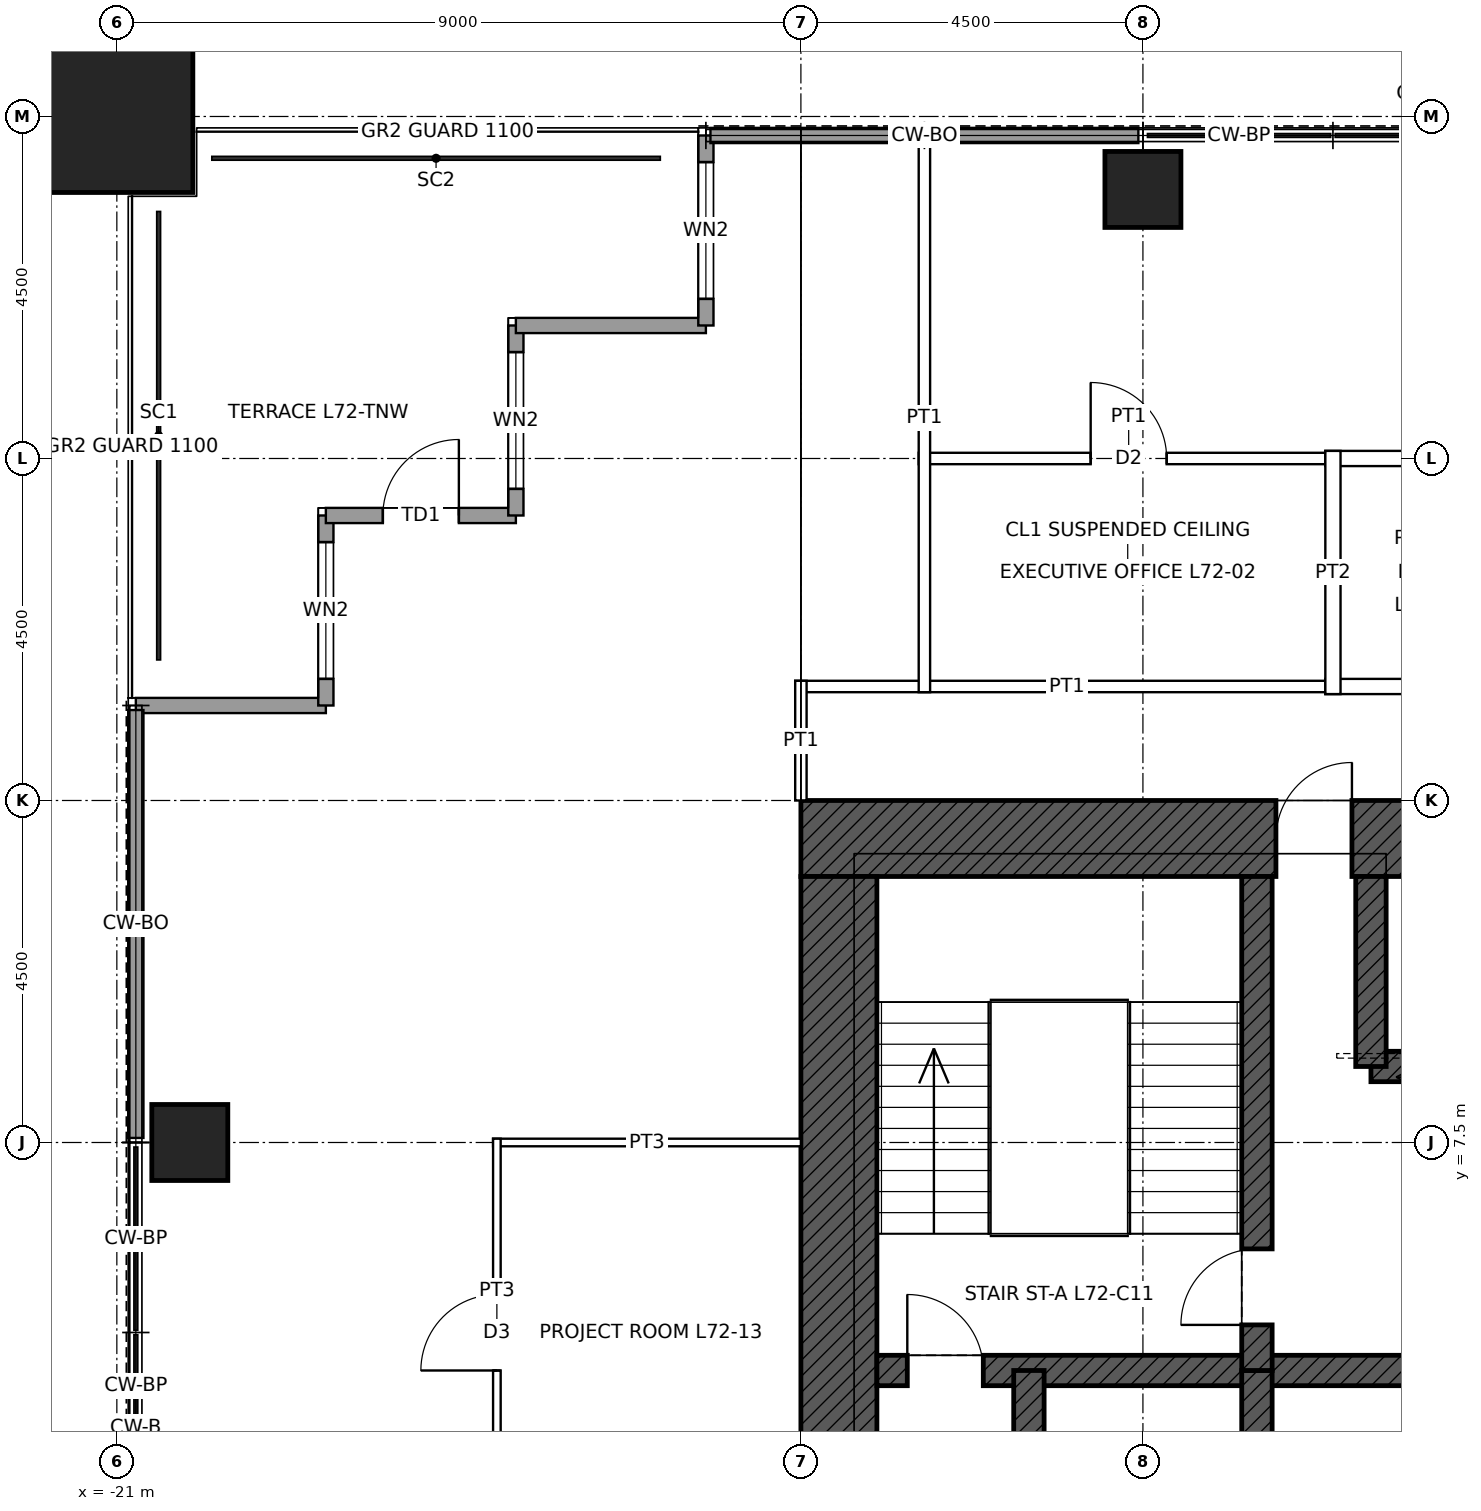
"""IFC4 building model, lengths in metres.
Left out: names, types, materials, properties, quantities, classifications, styles, units other than length and angle.
Written with IfcOpenShell. Run it as: python <this file> out.ifc"""

import sys

from ifc_helpers import new_model, si_unit, direction, frame, frame_2d, origin, origin_2d, place, context, subcontext, project, spatial, rectangle, hollow_rectangle, extrude, element, fill, save


model = new_model("IFC4")
c1 = context("Model", 3, precision=1e-05, world=origin(), true_north=direction((0.0, 1.0)))
c2 = subcontext(c1, "Body", "Model", "MODEL_VIEW")
j1 = project(units=[si_unit("LENGTHUNIT", "METRE"), si_unit("PLANEANGLEUNIT", "RADIAN")], contexts=[c1])
p1 = place(None, origin())
s1 = spatial("IfcSite", under=j1, at=p1, CompositionType="ELEMENT")
p2 = place(p1, origin())
s2 = spatial("IfcBuilding", under=s1, at=p2, CompositionType="ELEMENT")
p3 = place(p2, frame((0.0, 0.0, 323.9)))
s3 = spatial("IfcBuildingStorey", under=s2, at=p3, CompositionType="ELEMENT", Elevation=323.9)
p4 = place(p3, frame((-21.0, 21.0, 0.0), z_axis=(0.0, 0.0, 1.0), x_axis=(1.0, 0.0, 0.0)))
e1 = element("IfcColumn", 1, at=p4, inside=s3, PredefinedType="COLUMN", context=c2, shape_type="SweptSolid", body=[
    extrude(hollow_rectangle(XDim=2.0, YDim=2.0, WallThickness=0.095, at=origin_2d()), origin(), (0.0, 0.0, 1.0), 4.0),
])
for number, where, z_axis, x_axis in (
    (2, (-7.5, 20.04, 0.0), (0.0, 0.0, 1.0), (1.0, 0.0, 0.0)),
    (3, (-20.04, 7.5, 0.0), (0.0, 0.0, 1.0), (1.0, 0.0, 0.0)),
):
    element("IfcColumn", number, at=place(p3, frame(where, z_axis=z_axis, x_axis=x_axis)), inside=s3, PredefinedType="COLUMN", context=c2, shape_type="SweptSolid", body=[
        extrude(hollow_rectangle(XDim=1.0, YDim=1.0, WallThickness=0.075, at=origin_2d()), origin(), (0.0, 0.0, 1.0), 4.0),
    ])
p5 = place(p3, frame((-12.0, 11.5, 0.0), z_axis=(0.0, 0.0, 1.0), x_axis=(1.0, 0.0, 0.0)))
e4 = element("IfcWall", 4, at=p5, inside=s3, PredefinedType="SHEAR", context=c2, shape_type="SweptSolid", body=[
    extrude(rectangle(XDim=24.0, YDim=1.0, at=frame_2d((12.0, 0.0))), origin(), (0.0, 0.0, 1.0), 4.0),
])
p6 = place(p5, frame((6.25, 0.0, 0.0)))
e5 = element("IfcOpeningElement", 5, at=p6, cuts=e4, PredefinedType="OPENING", context=c2, shape_type="SweptSolid", body=[
    extrude(rectangle(XDim=1.0, YDim=2.4, at=frame_2d((0.5, 1.2))), frame((0.0, 0.51, 0.0), z_axis=(0.0, -1.0, 0.0), x_axis=(1.0, 0.0, 0.0)), (0.0, 0.0, 1.0), 1.02),
])
p7 = place(p5, frame((16.75, 0.0, 0.0)))
e6 = element("IfcOpeningElement", 6, at=p7, cuts=e4, PredefinedType="OPENING", context=c2, shape_type="SweptSolid", body=[
    extrude(rectangle(XDim=1.0, YDim=2.4, at=frame_2d((0.5, 1.2))), frame((0.0, 0.51, 0.0), z_axis=(0.0, -1.0, 0.0), x_axis=(1.0, 0.0, 0.0)), (0.0, 0.0, 1.0), 1.02),
])
p8 = place(p3, frame((-11.5, -11.0, 0.0), z_axis=(0.0, 0.0, 1.0), x_axis=(0.0, 1.0, 0.0)))
e7 = element("IfcWall", 7, at=p8, inside=s3, PredefinedType="SHEAR", context=c2, shape_type="SweptSolid", body=[
    extrude(rectangle(XDim=22.0, YDim=1.0, at=frame_2d((11.0, 0.0))), origin(), (0.0, 0.0, 1.0), 4.0),
])
p9 = place(p8, frame((10.5, 0.0, 0.0)))
e8 = element("IfcOpeningElement", 8, at=p9, cuts=e7, PredefinedType="OPENING", context=c2, shape_type="SweptSolid", body=[
    extrude(rectangle(XDim=1.0, YDim=2.4, at=frame_2d((0.5, 1.2))), frame((0.0, 0.51, 0.0), z_axis=(0.0, -1.0, 0.0), x_axis=(1.0, 0.0, 0.0)), (0.0, 0.0, 1.0), 1.02),
])
p10 = place(p3, frame((-11.0, 4.5, 0.0), z_axis=(0.0, 0.0, 1.0), x_axis=(1.0, 0.0, 0.0)))
e9 = element("IfcWall", 9, at=p10, inside=s3, PredefinedType="SHEAR", context=c2, shape_type="SweptSolid", body=[
    extrude(rectangle(XDim=22.0, YDim=0.4, at=frame_2d((11.0, 0.0))), origin(), (0.0, 0.0, 1.0), 4.0),
])
p11 = place(p10, frame((0.4, 0.0, 0.0)))
e10 = element("IfcOpeningElement", 10, at=p11, cuts=e9, PredefinedType="OPENING", context=c2, shape_type="SweptSolid", body=[
    extrude(rectangle(XDim=1.0, YDim=2.1, at=frame_2d((0.5, 1.05))), frame((0.0, 0.21, 0.0), z_axis=(0.0, -1.0, 0.0), x_axis=(1.0, 0.0, 0.0)), (0.0, 0.0, 1.0), 0.42),
])
p12 = place(p10, frame((20.6, 0.0, 0.0)))
e11 = element("IfcOpeningElement", 11, at=p12, cuts=e9, PredefinedType="OPENING", context=c2, shape_type="SweptSolid", body=[
    extrude(rectangle(XDim=1.0, YDim=2.1, at=frame_2d((0.5, 1.05))), frame((0.0, 0.21, 0.0), z_axis=(0.0, -1.0, 0.0), x_axis=(1.0, 0.0, 0.0)), (0.0, 0.0, 1.0), 0.42),
])
p13 = place(p3, frame((-4.5, 8.5, 0.0), z_axis=(0.0, 0.0, 1.0), x_axis=(1.0, 0.0, 0.0)))
e12 = element("IfcWall", 12, at=p13, inside=s3, PredefinedType="SHEAR", context=c2, shape_type="SweptSolid", body=[
    extrude(rectangle(XDim=9.0, YDim=0.4, at=frame_2d((4.5, 0.0))), origin(), (0.0, 0.0, 1.0), 4.0),
])
p14 = place(p13, frame((0.85, 0.0, 0.0)))
e13 = element("IfcOpeningElement", 13, at=p14, cuts=e12, PredefinedType="OPENING", context=c2, shape_type="SweptSolid", body=[
    extrude(rectangle(XDim=1.3, YDim=2.4, at=frame_2d((0.65, 1.2))), frame((0.0, 0.21, 0.0), z_axis=(0.0, -1.0, 0.0), x_axis=(1.0, 0.0, 0.0)), (0.0, 0.0, 1.0), 0.42),
])
p15 = place(p13, frame((6.85, 0.0, 0.0)))
e14 = element("IfcOpeningElement", 14, at=p15, cuts=e12, PredefinedType="OPENING", context=c2, shape_type="SweptSolid", body=[
    extrude(rectangle(XDim=1.3, YDim=2.4, at=frame_2d((0.65, 1.2))), frame((0.0, 0.21, 0.0), z_axis=(0.0, -1.0, 0.0), x_axis=(1.0, 0.0, 0.0)), (0.0, 0.0, 1.0), 0.42),
])
p16 = place(p13, frame((3.85, 0.0, 0.0)))
e15 = element("IfcOpeningElement", 15, at=p16, cuts=e12, PredefinedType="OPENING", context=c2, shape_type="SweptSolid", body=[
    extrude(rectangle(XDim=1.3, YDim=2.4, at=frame_2d((0.65, 1.2))), frame((0.0, 0.21, 0.0), z_axis=(0.0, -1.0, 0.0), x_axis=(1.0, 0.0, 0.0)), (0.0, 0.0, 1.0), 0.42),
])
for number, where, z_axis, x_axis in (
    (16, (-9.0, 1.5, 0.0), (0.0, 0.0, 1.0), (0.0, 1.0, 0.0)),
    (17, (-6.0, 1.5, 0.0), (0.0, 0.0, 1.0), (0.0, 1.0, 0.0)),
):
    element("IfcWall", number, at=place(p3, frame(where, z_axis=z_axis, x_axis=x_axis)), inside=s3, PredefinedType="SHEAR", context=c2, shape_type="SweptSolid", body=[
        extrude(rectangle(XDim=3.0, YDim=0.4, at=frame_2d((1.5, 0.0))), origin(), (0.0, 0.0, 1.0), 4.0),
    ])
p17 = place(p3, frame((-6.0, 4.5, 0.0), z_axis=(0.0, 0.0, 1.0), x_axis=(0.0, 1.0, 0.0)))
e18 = element("IfcWall", 18, at=p17, inside=s3, PredefinedType="SHEAR", context=c2, shape_type="SweptSolid", body=[
    extrude(rectangle(XDim=6.5, YDim=0.4, at=frame_2d((3.25, 0.0))), origin(), (0.0, 0.0, 1.0), 4.0),
])
p18 = place(p17, frame((0.6, 0.0, 0.0)))
e19 = element("IfcOpeningElement", 19, at=p18, cuts=e18, PredefinedType="OPENING", context=c2, shape_type="SweptSolid", body=[
    extrude(rectangle(XDim=1.0, YDim=2.1, at=frame_2d((0.5, 1.05))), frame((0.0, 0.21, 0.0), z_axis=(0.0, -1.0, 0.0), x_axis=(1.0, 0.0, 0.0)), (0.0, 0.0, 1.0), 0.42),
])
p19 = place(p3, frame((-4.5, 8.5, 0.0), z_axis=(0.0, 0.0, 1.0), x_axis=(0.0, 1.0, 0.0)))
e20 = element("IfcWall", 20, at=p19, inside=s3, PredefinedType="SHEAR", context=c2, shape_type="SweptSolid", body=[
    extrude(rectangle(XDim=2.5, YDim=0.4, at=frame_2d((1.25, 0.0))), origin(), (0.0, 0.0, 1.0), 4.0),
])
p20 = place(p3, frame((-20.75, 13.25, 0.0), z_axis=(0.0, 0.0, 1.0), x_axis=(1.0, 0.0, 0.0)))
e21 = element("IfcWall", 21, at=p20, inside=s3, PredefinedType="SOLIDWALL", context=c2, shape_type="SweptSolid", body=[
    extrude(rectangle(XDim=2.5, YDim=0.2, at=frame_2d((1.25, 0.0))), origin(), (0.0, 0.0, 1.0), 3.85),
])
p21 = place(p3, frame((-18.25, 13.25, 0.0), z_axis=(0.0, 0.0, 1.0), x_axis=(0.0, 1.0, 0.0)))
e22 = element("IfcWall", 22, at=p21, inside=s3, PredefinedType="SOLIDWALL", context=c2, shape_type="SweptSolid", body=[
    extrude(rectangle(XDim=2.5, YDim=0.2, at=frame_2d((1.25, 0.0))), origin(), (0.0, 0.0, 1.0), 3.85),
])
p22 = place(p21, frame((0.35, 0.0, 0.3)))
e23 = element("IfcOpeningElement", 23, at=p22, cuts=e22, PredefinedType="OPENING", context=c2, shape_type="SweptSolid", body=[
    extrude(rectangle(XDim=1.8, YDim=2.4, at=frame_2d((0.9, 1.2))), frame((0.0, 0.11, 0.0), z_axis=(0.0, -1.0, 0.0), x_axis=(1.0, 0.0, 0.0)), (0.0, 0.0, 1.0), 0.22),
])
p23 = place(p3, frame((-18.25, 15.75, 0.0), z_axis=(0.0, 0.0, 1.0), x_axis=(1.0, 0.0, 0.0)))
e24 = element("IfcWall", 24, at=p23, inside=s3, PredefinedType="SOLIDWALL", context=c2, shape_type="SweptSolid", body=[
    extrude(rectangle(XDim=2.5, YDim=0.2, at=frame_2d((1.25, 0.0))), origin(), (0.0, 0.0, 1.0), 3.317),
])
p24 = place(p23, frame((0.75, 0.0, 0.0)))
e25 = element("IfcOpeningElement", 25, at=p24, cuts=e24, PredefinedType="OPENING", context=c2, shape_type="SweptSolid", body=[
    extrude(rectangle(XDim=1.0, YDim=2.4, at=frame_2d((0.5, 1.2))), frame((0.0, 0.11, 0.0), z_axis=(0.0, -1.0, 0.0), x_axis=(1.0, 0.0, 0.0)), (0.0, 0.0, 1.0), 0.22),
])
p25 = place(p3, frame((-15.75, 15.75, 0.0), z_axis=(0.0, 0.0, 1.0), x_axis=(0.0, 1.0, 0.0)))
e26 = element("IfcWall", 26, at=p25, inside=s3, PredefinedType="SOLIDWALL", context=c2, shape_type="SweptSolid", body=[
    extrude(rectangle(XDim=2.5, YDim=0.2, at=frame_2d((1.25, 0.0))), origin(), (0.0, 0.0, 1.0), 3.85),
])
p26 = place(p25, frame((0.35, 0.0, 0.3)))
e27 = element("IfcOpeningElement", 27, at=p26, cuts=e26, PredefinedType="OPENING", context=c2, shape_type="SweptSolid", body=[
    extrude(rectangle(XDim=1.8, YDim=2.4, at=frame_2d((0.9, 1.2))), frame((0.0, 0.11, 0.0), z_axis=(0.0, -1.0, 0.0), x_axis=(1.0, 0.0, 0.0)), (0.0, 0.0, 1.0), 0.22),
])
p27 = place(p3, frame((-15.75, 18.25, 0.0), z_axis=(0.0, 0.0, 1.0), x_axis=(1.0, 0.0, 0.0)))
e28 = element("IfcWall", 28, at=p27, inside=s3, PredefinedType="SOLIDWALL", context=c2, shape_type="SweptSolid", body=[
    extrude(rectangle(XDim=2.5, YDim=0.2, at=frame_2d((1.25, 0.0))), origin(), (0.0, 0.0, 1.0), 3.85),
])
p28 = place(p3, frame((-13.25, 18.25, 0.0), z_axis=(0.0, 0.0, 1.0), x_axis=(0.0, 1.0, 0.0)))
e29 = element("IfcWall", 29, at=p28, inside=s3, PredefinedType="SOLIDWALL", context=c2, shape_type="SweptSolid", body=[
    extrude(rectangle(XDim=2.5, YDim=0.2, at=frame_2d((1.25, 0.0))), origin(), (0.0, 0.0, 1.0), 3.85),
])
p29 = place(p28, frame((0.35, 0.0, 0.3)))
e30 = element("IfcOpeningElement", 30, at=p29, cuts=e29, PredefinedType="OPENING", context=c2, shape_type="SweptSolid", body=[
    extrude(rectangle(XDim=1.8, YDim=2.4, at=frame_2d((0.9, 1.2))), frame((0.0, 0.11, 0.0), z_axis=(0.0, -1.0, 0.0), x_axis=(1.0, 0.0, 0.0)), (0.0, 0.0, 1.0), 0.22),
])
for number, where, z_axis, x_axis in (
    (31, (-13.19, 20.75, 0.0), (0.0, 0.0, 1.0), (1.0, 0.0, 0.0)),
    (32, (-10.345, 20.75, 0.0), (0.0, 0.0, 1.0), (1.0, 0.0, 0.0)),
    (33, (-20.75, 7.56, 0.0), (0.0, 0.0, 1.0), (0.0, 1.0, 0.0)),
    (34, (-20.75, 10.405, 0.0), (0.0, 0.0, 1.0), (0.0, 1.0, 0.0)),
):
    element("IfcWall", number, at=place(p3, frame(where, z_axis=z_axis, x_axis=x_axis)), inside=s3, PredefinedType="SOLIDWALL", context=c2, shape_type="SweptSolid", body=[
        extrude(rectangle(XDim=2.785, YDim=0.2, at=frame_2d((1.393, 0.0))), origin(), (0.0, 0.0, 1.0), 3.85),
    ])
p30 = place(p3, frame((-16.05, 7.5, 0.0), z_axis=(0.0, 0.0, 1.0), x_axis=(1.0, 0.0, 0.0)))
e35 = element("IfcWall", 35, at=p30, inside=s3, PredefinedType="PARTITIONING", context=c2, shape_type="SweptSolid", body=[
    extrude(rectangle(XDim=4.05, YDim=0.1, at=frame_2d((2.025, 0.0))), origin(), (0.0, 0.0, 1.0), 3.243),
])
p31 = place(p3, frame((-12.075, 13.5, 0.0), z_axis=(0.0, 0.0, 1.0), x_axis=(1.0, 0.0, 0.0)))
e36 = element("IfcWall", 36, at=p31, inside=s3, PredefinedType="PARTITIONING", context=c2, shape_type="SweptSolid", body=[
    extrude(rectangle(XDim=7.15, YDim=0.15, at=frame_2d((3.575, 0.0))), origin(), (0.0, 0.0, 1.0), 3.85),
])
p32 = place(p3, frame((-5.1, 13.5, 0.0), z_axis=(0.0, 0.0, 1.0), x_axis=(1.0, 0.0, 0.0)))
e37 = element("IfcWall", 37, at=p32, inside=s3, PredefinedType="PARTITIONING", context=c2, shape_type="SweptSolid", body=[
    extrude(rectangle(XDim=2.7, YDim=0.2, at=frame_2d((1.35, 0.0))), origin(), (0.0, 0.0, 1.0), 3.85),
])
p33 = place(p3, frame((-10.45, 16.5, 0.0), z_axis=(0.0, 0.0, 1.0), x_axis=(1.0, 0.0, 0.0)))
e38 = element("IfcWall", 38, at=p33, inside=s3, PredefinedType="PARTITIONING", context=c2, shape_type="SweptSolid", body=[
    extrude(rectangle(XDim=5.525, YDim=0.15, at=frame_2d((2.762, 0.0))), origin(), (0.0, 0.0, 1.0), 3.85),
])
p34 = place(p33, frame((2.262, 0.0, 0.0)))
e39 = element("IfcOpeningElement", 39, at=p34, cuts=e38, PredefinedType="OPENING", context=c2, shape_type="SweptSolid", body=[
    extrude(rectangle(XDim=1.0, YDim=2.1, at=frame_2d((0.5, 1.05))), frame((0.0, 0.085, 0.0), z_axis=(0.0, -1.0, 0.0), x_axis=(1.0, 0.0, 0.0)), (0.0, 0.0, 1.0), 0.17),
])
p35 = place(p3, frame((-5.1, 16.5, 0.0), z_axis=(0.0, 0.0, 1.0), x_axis=(1.0, 0.0, 0.0)))
e40 = element("IfcWall", 40, at=p35, inside=s3, PredefinedType="PARTITIONING", context=c2, shape_type="SweptSolid", body=[
    extrude(rectangle(XDim=2.7, YDim=0.2, at=frame_2d((1.35, 0.0))), origin(), (0.0, 0.0, 1.0), 3.85),
])
p36 = place(p3, frame((-16.0, 2.45, 0.0), z_axis=(0.0, 0.0, 1.0), x_axis=(0.0, 1.0, 0.0)))
e41 = element("IfcWall", 41, at=p36, inside=s3, PredefinedType="PARTITIONING", context=c2, shape_type="SweptSolid", body=[
    extrude(rectangle(XDim=5.1, YDim=0.1, at=frame_2d((2.55, 0.0))), origin(), (0.0, 0.0, 1.0), 3.85),
])
p37 = place(p36, frame((2.05, 0.0, 0.0)))
e42 = element("IfcOpeningElement", 42, at=p37, cuts=e41, PredefinedType="OPENING", context=c2, shape_type="SweptSolid", body=[
    extrude(rectangle(XDim=1.0, YDim=2.1, at=frame_2d((0.5, 1.05))), frame((0.0, 0.06, 0.0), z_axis=(0.0, -1.0, 0.0), x_axis=(1.0, 0.0, 0.0)), (0.0, 0.0, 1.0), 0.12),
])
p38 = place(p3, frame((-12.0, 12.0, 0.0), z_axis=(0.0, 0.0, 1.0), x_axis=(0.0, 1.0, 0.0)))
e43 = element("IfcWall", 43, at=p38, inside=s3, PredefinedType="PARTITIONING", context=c2, shape_type="SweptSolid", body=[
    extrude(rectangle(XDim=1.575, YDim=0.15, at=frame_2d((0.788, 0.0))), origin(), (0.0, 0.0, 1.0), 3.01),
])
p39 = place(p3, frame((-10.375, 13.425, 0.0), z_axis=(0.0, 0.0, 1.0), x_axis=(0.0, 1.0, 0.0)))
e44 = element("IfcWall", 44, at=p39, inside=s3, PredefinedType="PARTITIONING", context=c2, shape_type="SweptSolid", body=[
    extrude(rectangle(XDim=7.225, YDim=0.15, at=frame_2d((3.612, 0.0))), origin(), (0.0, 0.0, 1.0), 3.85),
])
p40 = place(p3, frame((-5.0, 13.4, 0.0), z_axis=(0.0, 0.0, 1.0), x_axis=(0.0, 1.0, 0.0)))
e45 = element("IfcWall", 45, at=p40, inside=s3, PredefinedType="PARTITIONING", context=c2, shape_type="SweptSolid", body=[
    extrude(rectangle(XDim=3.2, YDim=0.2, at=frame_2d((1.6, 0.0))), origin(), (0.0, 0.0, 1.0), 3.85),
])
p41 = place(p22, origin())
e46 = element("IfcWindow", 46, at=p41, inside=s3, PartitioningType="SINGLE_PANEL", PredefinedType="WINDOW", context=c2, shape_type="SweptSolid", body=[
    extrude(rectangle(XDim=1.8, YDim=2.4, at=frame_2d((0.9, 1.2))), frame((0.0, 0.03, 0.0), z_axis=(0.0, -1.0, 0.0), x_axis=(1.0, 0.0, 0.0)), (0.0, 0.0, 1.0), 0.06),
])
fill(e23, e46)
p42 = place(p24, origin())
e47 = element("IfcDoor", 47, at=p42, inside=s3, OperationType="SINGLE_SWING_RIGHT", PredefinedType="DOOR", context=c2, shape_type="SweptSolid", body=[
    extrude(rectangle(XDim=1.0, YDim=2.4, at=frame_2d((0.5, 1.2))), frame((0.0, 0.025, 0.0), z_axis=(0.0, -1.0, 0.0), x_axis=(1.0, 0.0, 0.0)), (0.0, 0.0, 1.0), 0.05),
])
fill(e25, e47)
p43 = place(p26, origin())
e48 = element("IfcWindow", 48, at=p43, inside=s3, PartitioningType="SINGLE_PANEL", PredefinedType="WINDOW", context=c2, shape_type="SweptSolid", body=[
    extrude(rectangle(XDim=1.8, YDim=2.4, at=frame_2d((0.9, 1.2))), frame((0.0, 0.03, 0.0), z_axis=(0.0, -1.0, 0.0), x_axis=(1.0, 0.0, 0.0)), (0.0, 0.0, 1.0), 0.06),
])
fill(e27, e48)
p44 = place(p29, origin())
e49 = element("IfcWindow", 49, at=p44, inside=s3, PartitioningType="SINGLE_PANEL", PredefinedType="WINDOW", context=c2, shape_type="SweptSolid", body=[
    extrude(rectangle(XDim=1.8, YDim=2.4, at=frame_2d((0.9, 1.2))), frame((0.0, 0.03, 0.0), z_axis=(0.0, -1.0, 0.0), x_axis=(1.0, 0.0, 0.0)), (0.0, 0.0, 1.0), 0.06),
])
fill(e30, e49)
p45 = place(p11, origin())
e50 = element("IfcDoor", 50, at=p45, inside=s3, OperationType="SINGLE_SWING_LEFT", PredefinedType="DOOR", context=c2, shape_type="SweptSolid", body=[
    extrude(rectangle(XDim=1.0, YDim=2.1, at=frame_2d((0.5, 1.05))), frame((0.0, 0.025, 0.0), z_axis=(0.0, -1.0, 0.0), x_axis=(1.0, 0.0, 0.0)), (0.0, 0.0, 1.0), 0.05),
])
fill(e10, e50)
p46 = place(p18, origin())
e51 = element("IfcDoor", 51, at=p46, inside=s3, OperationType="SINGLE_SWING_LEFT", PredefinedType="DOOR", context=c2, shape_type="SweptSolid", body=[
    extrude(rectangle(XDim=1.0, YDim=2.1, at=frame_2d((0.5, 1.05))), frame((0.0, 0.025, 0.0), z_axis=(0.0, -1.0, 0.0), x_axis=(1.0, 0.0, 0.0)), (0.0, 0.0, 1.0), 0.05),
])
fill(e19, e51)
p47 = place(p6, origin())
e52 = element("IfcDoor", 52, at=p47, inside=s3, OperationType="SINGLE_SWING_RIGHT", PredefinedType="DOOR", context=c2, shape_type="SweptSolid", body=[
    extrude(rectangle(XDim=1.0, YDim=2.4, at=frame_2d((0.5, 1.2))), frame((0.0, 0.485, 0.0), z_axis=(0.0, -1.0, 0.0), x_axis=(1.0, 0.0, 0.0)), (0.0, 0.0, 1.0), 0.05),
])
fill(e5, e52)
p48 = place(p34, origin())
e53 = element("IfcDoor", 53, at=p48, inside=s3, OperationType="SINGLE_SWING_LEFT", PredefinedType="DOOR", context=c2, shape_type="SweptSolid", body=[
    extrude(rectangle(XDim=1.0, YDim=2.1, at=frame_2d((0.5, 1.05))), frame((0.0, 0.025, 0.0), z_axis=(0.0, -1.0, 0.0), x_axis=(1.0, 0.0, 0.0)), (0.0, 0.0, 1.0), 0.05),
])
fill(e39, e53)
p49 = place(p37, origin())
e54 = element("IfcDoor", 54, at=p49, inside=s3, OperationType="SINGLE_SWING_LEFT", PredefinedType="DOOR", context=c2, shape_type="SweptSolid", body=[
    extrude(rectangle(XDim=1.0, YDim=2.1, at=frame_2d((0.5, 1.05))), frame((0.0, 0.025, 0.0), z_axis=(0.0, -1.0, 0.0), x_axis=(1.0, 0.0, 0.0)), (0.0, 0.0, 1.0), 0.05),
])
fill(e42, e54)
save(model, sys.argv[1])
